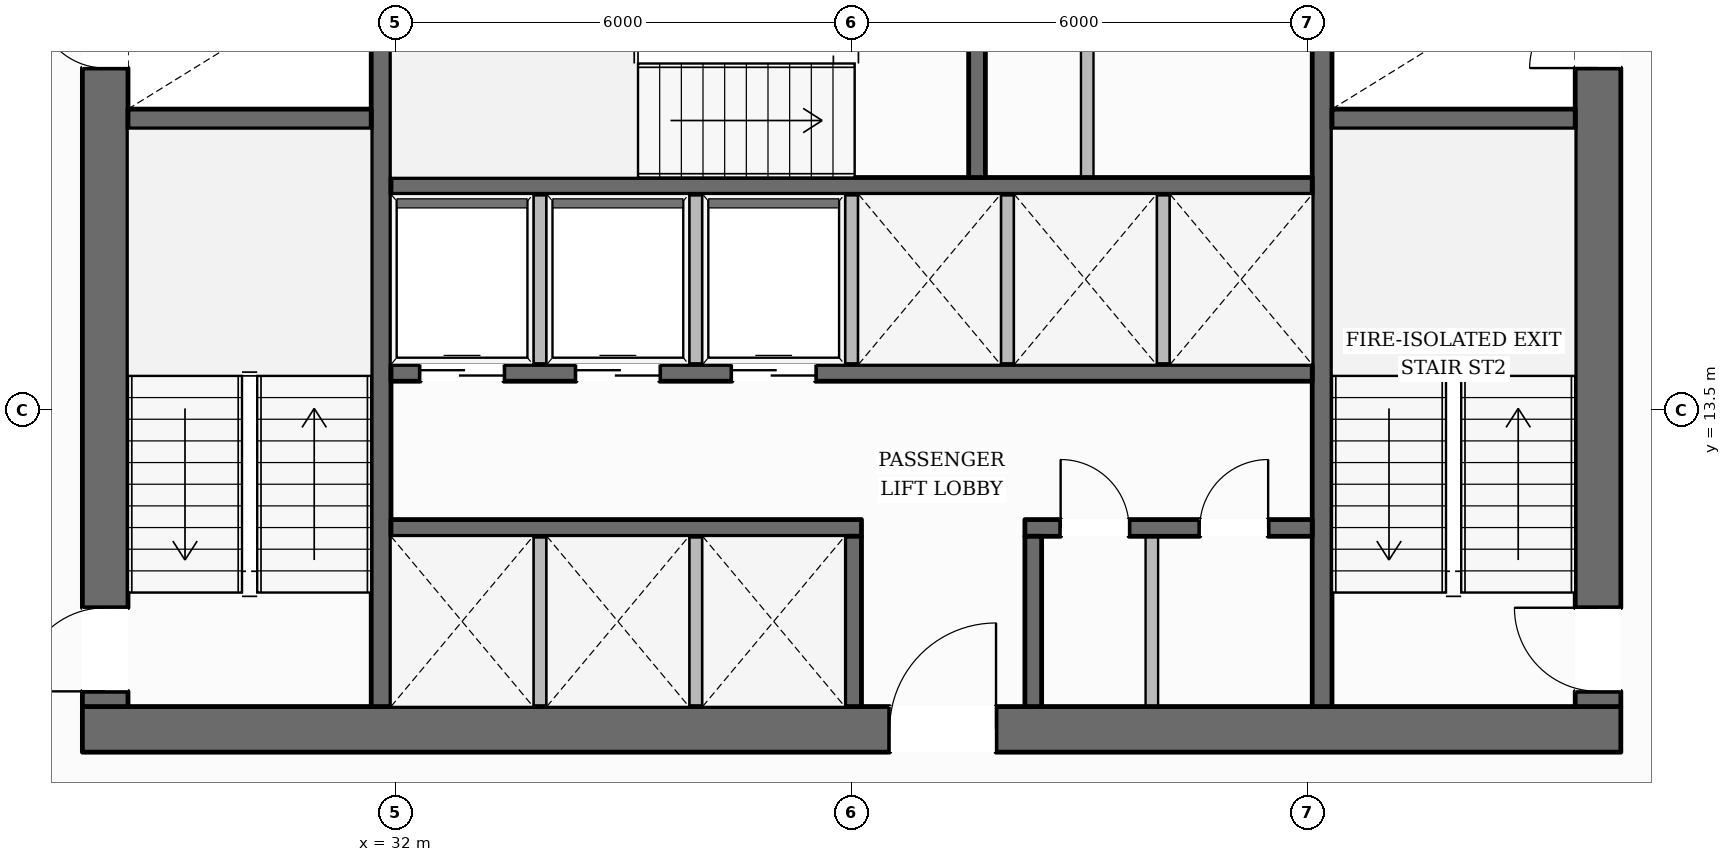
"""IFC4 building model, lengths in metres.
Left out: names, types, materials, properties, quantities, classifications, styles, units other than length and angle.
Written with IfcOpenShell. Run it as: python <this file> out.ifc"""

import sys

from ifc_helpers import new_model, si_unit, direction, frame, frame_2d, origin, place, context, subcontext, project, spatial, rectangle, extrude, element, fill, save


model = new_model("IFC4")
c1 = context("Model", 3, precision=1e-05, world=origin(), true_north=direction((0.0, 1.0)))
c2 = subcontext(c1, "Body", "Model", "MODEL_VIEW")
j1 = project(units=[si_unit("LENGTHUNIT", "METRE"), si_unit("PLANEANGLEUNIT", "RADIAN")], contexts=[c1])
p1 = place(None, origin())
s1 = spatial("IfcSite", under=j1, at=p1, CompositionType="ELEMENT")
p2 = place(p1, origin())
s2 = spatial("IfcBuilding", under=s1, at=p2, CompositionType="ELEMENT")
p3 = place(p2, frame((0.0, 0.0, 67.6)))
s3 = spatial("IfcBuildingStorey", under=s2, at=p3, CompositionType="ELEMENT", Elevation=67.6)
p4 = place(p3, frame((27.88, 9.3, 0.0), z_axis=(0.0, 0.0, 1.0), x_axis=(1.0, 0.0, 0.0)))
e1 = element("IfcWall", 1, at=p4, inside=s3, PredefinedType="SOLIDWALL", context=c2, shape_type="SweptSolid", body=[
    extrude(rectangle(XDim=20.24, YDim=0.6, at=frame_2d((10.12, 0.0))), origin(), (0.0, 0.0, 1.0), 3.59),
])
p5 = place(p4, frame((10.62, 0.0, 0.0)))
e2 = element("IfcOpeningElement", 2, at=p5, cuts=e1, PredefinedType="OPENING", context=c2, shape_type="SweptSolid", body=[
    extrude(rectangle(XDim=1.4, YDim=2.2, at=frame_2d((0.7, 1.1))), frame((0.0, 0.31, 0.0), z_axis=(0.0, -1.0, 0.0), x_axis=(1.0, 0.0, 0.0)), (0.0, 0.0, 1.0), 0.62),
])
p6 = place(p3, frame((28.18, 9.6, 0.0), z_axis=(0.0, 0.0, 1.0), x_axis=(0.0, 1.0, 0.0)))
e3 = element("IfcWall", 3, at=p6, inside=s3, PredefinedType="SOLIDWALL", context=c2, shape_type="SweptSolid", body=[
    extrude(rectangle(XDim=13.0, YDim=0.6, at=frame_2d((6.5, 0.0))), origin(), (0.0, 0.0, 1.0), 3.59),
])
p7 = place(p6, frame((0.2, 0.0, 0.0)))
e4 = element("IfcOpeningElement", 4, at=p7, cuts=e3, PredefinedType="OPENING", context=c2, shape_type="SweptSolid", body=[
    extrude(rectangle(XDim=1.1, YDim=2.15, at=frame_2d((0.55, 1.075))), frame((0.0, 0.31, 0.0), z_axis=(0.0, -1.0, 0.0), x_axis=(1.0, 0.0, 0.0)), (0.0, 0.0, 1.0), 0.62),
])
p8 = place(p6, frame((8.4, 0.0, 0.0)))
e5 = element("IfcOpeningElement", 5, at=p8, cuts=e3, PredefinedType="OPENING", context=c2, shape_type="SweptSolid", body=[
    extrude(rectangle(XDim=0.9, YDim=2.1, at=frame_2d((0.45, 1.05))), frame((0.0, 0.31, 0.0), z_axis=(0.0, -1.0, 0.0), x_axis=(1.0, 0.0, 0.0)), (0.0, 0.0, 1.0), 0.62),
])
p9 = place(p3, frame((47.82, 9.6, 0.0), z_axis=(0.0, 0.0, 1.0), x_axis=(0.0, 1.0, 0.0)))
e6 = element("IfcWall", 6, at=p9, inside=s3, PredefinedType="SOLIDWALL", context=c2, shape_type="SweptSolid", body=[
    extrude(rectangle(XDim=13.0, YDim=0.6, at=frame_2d((6.5, 0.0))), origin(), (0.0, 0.0, 1.0), 3.59),
])
p10 = place(p9, frame((0.2, 0.0, 0.0)))
e7 = element("IfcOpeningElement", 7, at=p10, cuts=e6, PredefinedType="OPENING", context=c2, shape_type="SweptSolid", body=[
    extrude(rectangle(XDim=1.1, YDim=2.15, at=frame_2d((0.55, 1.075))), frame((0.0, 0.31, 0.0), z_axis=(0.0, -1.0, 0.0), x_axis=(1.0, 0.0, 0.0)), (0.0, 0.0, 1.0), 0.62),
])
p11 = place(p9, frame((8.4, 0.0, 0.0)))
e8 = element("IfcOpeningElement", 8, at=p11, cuts=e6, PredefinedType="OPENING", context=c2, shape_type="SweptSolid", body=[
    extrude(rectangle(XDim=0.9, YDim=2.1, at=frame_2d((0.45, 1.05))), frame((0.0, 0.31, 0.0), z_axis=(0.0, -1.0, 0.0), x_axis=(1.0, 0.0, 0.0)), (0.0, 0.0, 1.0), 0.62),
])
p12 = place(p3, frame((31.81, 9.6, 0.0), z_axis=(0.0, 0.0, 1.0), x_axis=(0.0, 1.0, 0.0)))
e9 = element("IfcWall", 9, at=p12, inside=s3, PredefinedType="SHEAR", context=c2, shape_type="SweptSolid", body=[
    extrude(rectangle(XDim=13.0, YDim=0.26, at=frame_2d((6.5, 0.0))), origin(), (0.0, 0.0, 1.0), 3.59),
])
p13 = place(p12, frame((10.925, 0.0, 0.0)))
e10 = element("IfcOpeningElement", 10, at=p13, cuts=e9, PredefinedType="OPENING", context=c2, shape_type="SweptSolid", body=[
    extrude(rectangle(XDim=1.25, YDim=2.25, at=frame_2d((0.625, 1.125))), frame((0.0, 0.14, 0.0), z_axis=(0.0, -1.0, 0.0), x_axis=(1.0, 0.0, 0.0)), (0.0, 0.0, 1.0), 0.28),
])
p14 = place(p3, frame((44.19, 9.6, 0.0), z_axis=(0.0, 0.0, 1.0), x_axis=(0.0, 1.0, 0.0)))
e11 = element("IfcWall", 11, at=p14, inside=s3, PredefinedType="SHEAR", context=c2, shape_type="SweptSolid", body=[
    extrude(rectangle(XDim=13.0, YDim=0.26, at=frame_2d((6.5, 0.0))), origin(), (0.0, 0.0, 1.0), 3.59),
])
p15 = place(p14, frame((10.925, 0.0, 0.0)))
e12 = element("IfcOpeningElement", 12, at=p15, cuts=e11, PredefinedType="OPENING", context=c2, shape_type="SweptSolid", body=[
    extrude(rectangle(XDim=1.25, YDim=2.25, at=frame_2d((0.625, 1.125))), frame((0.0, 0.14, 0.0), z_axis=(0.0, -1.0, 0.0), x_axis=(1.0, 0.0, 0.0)), (0.0, 0.0, 1.0), 0.28),
])
for number, where, z_axis, x_axis in (
    (13, (28.48, 17.33, 0.0), (0.0, 0.0, 1.0), (1.0, 0.0, 0.0)),
    (14, (44.32, 17.33, 0.0), (0.0, 0.0, 1.0), (1.0, 0.0, 0.0)),
):
    element("IfcWall", number, at=place(p3, frame(where, z_axis=z_axis, x_axis=x_axis)), inside=s3, PredefinedType="SHEAR", context=c2, shape_type="SweptSolid", body=[
        extrude(rectangle(XDim=3.2, YDim=0.26, at=frame_2d((1.6, 0.0))), origin(), (0.0, 0.0, 1.0), 3.59),
    ])
p16 = place(p3, frame((31.94, 16.45, 0.0), z_axis=(0.0, 0.0, 1.0), x_axis=(1.0, 0.0, 0.0)))
e15 = element("IfcWall", 15, at=p16, inside=s3, PredefinedType="SOLIDWALL", context=c2, shape_type="SweptSolid", body=[
    extrude(rectangle(XDim=12.12, YDim=0.22, at=frame_2d((6.06, 0.0))), origin(), (0.0, 0.0, 1.0), 3.59),
])
p17 = place(p3, frame((39.65, 16.56, 0.0), z_axis=(0.0, 0.0, 1.0), x_axis=(0.0, 1.0, 0.0)))
e16 = element("IfcWall", 16, at=p17, inside=s3, PredefinedType="SOLIDWALL", context=c2, shape_type="SweptSolid", body=[
    extrude(rectangle(XDim=3.2, YDim=0.22, at=frame_2d((1.6, 0.0))), origin(), (0.0, 0.0, 1.0), 3.59),
])
p18 = place(p3, frame((31.94, 13.99, 0.0), z_axis=(0.0, 0.0, 1.0), x_axis=(1.0, 0.0, 0.0)))
e17 = element("IfcWall", 17, at=p18, inside=s3, PredefinedType="SOLIDWALL", context=c2, shape_type="SweptSolid", body=[
    extrude(rectangle(XDim=12.12, YDim=0.22, at=frame_2d((6.06, 0.0))), origin(), (0.0, 0.0, 1.0), 3.59),
])
p19 = place(p18, frame((0.385, 0.0, 0.0)))
e18 = element("IfcOpeningElement", 18, at=p19, cuts=e17, PredefinedType="OPENING", context=c2, shape_type="SweptSolid", body=[
    extrude(rectangle(XDim=1.1, YDim=2.2, at=frame_2d((0.55, 1.1))), frame((0.0, 0.12, 0.0), z_axis=(0.0, -1.0, 0.0), x_axis=(1.0, 0.0, 0.0)), (0.0, 0.0, 1.0), 0.24),
])
p20 = place(p18, frame((2.435, 0.0, 0.0)))
e19 = element("IfcOpeningElement", 19, at=p20, cuts=e17, PredefinedType="OPENING", context=c2, shape_type="SweptSolid", body=[
    extrude(rectangle(XDim=1.1, YDim=2.2, at=frame_2d((0.55, 1.1))), frame((0.0, 0.12, 0.0), z_axis=(0.0, -1.0, 0.0), x_axis=(1.0, 0.0, 0.0)), (0.0, 0.0, 1.0), 0.24),
])
p21 = place(p18, frame((4.485, 0.0, 0.0)))
e20 = element("IfcOpeningElement", 20, at=p21, cuts=e17, PredefinedType="OPENING", context=c2, shape_type="SweptSolid", body=[
    extrude(rectangle(XDim=1.1, YDim=2.2, at=frame_2d((0.55, 1.1))), frame((0.0, 0.12, 0.0), z_axis=(0.0, -1.0, 0.0), x_axis=(1.0, 0.0, 0.0)), (0.0, 0.0, 1.0), 0.24),
])
p22 = place(p3, frame((31.94, 11.95, 0.0), z_axis=(0.0, 0.0, 1.0), x_axis=(1.0, 0.0, 0.0)))
e21 = element("IfcWall", 21, at=p22, inside=s3, PredefinedType="SOLIDWALL", context=c2, shape_type="SweptSolid", body=[
    extrude(rectangle(XDim=6.19, YDim=0.22, at=frame_2d((3.095, 0.0))), origin(), (0.0, 0.0, 1.0), 3.59),
])
p23 = place(p3, frame((40.28, 11.95, 0.0), z_axis=(0.0, 0.0, 1.0), x_axis=(1.0, 0.0, 0.0)))
e22 = element("IfcWall", 22, at=p23, inside=s3, PredefinedType="SOLIDWALL", context=c2, shape_type="SweptSolid", body=[
    extrude(rectangle(XDim=3.78, YDim=0.22, at=frame_2d((1.89, 0.0))), origin(), (0.0, 0.0, 1.0), 3.59),
])
p24 = place(p23, frame((0.47, 0.0, 0.0)))
e23 = element("IfcOpeningElement", 23, at=p24, cuts=e22, PredefinedType="OPENING", context=c2, shape_type="SweptSolid", body=[
    extrude(rectangle(XDim=0.9, YDim=2.1, at=frame_2d((0.45, 1.05))), frame((0.0, 0.12, 0.0), z_axis=(0.0, -1.0, 0.0), x_axis=(1.0, 0.0, 0.0)), (0.0, 0.0, 1.0), 0.24),
])
p25 = place(p23, frame((2.3, 0.0, 0.0)))
e24 = element("IfcOpeningElement", 24, at=p25, cuts=e22, PredefinedType="OPENING", context=c2, shape_type="SweptSolid", body=[
    extrude(rectangle(XDim=0.9, YDim=2.1, at=frame_2d((0.45, 1.05))), frame((0.0, 0.12, 0.0), z_axis=(0.0, -1.0, 0.0), x_axis=(1.0, 0.0, 0.0)), (0.0, 0.0, 1.0), 0.24),
])
for number, where, z_axis, x_axis in (
    (25, (38.02, 9.6, 0.0), (0.0, 0.0, 1.0), (0.0, 1.0, 0.0)),
    (26, (40.39, 9.6, 0.0), (0.0, 0.0, 1.0), (0.0, 1.0, 0.0)),
):
    element("IfcWall", number, at=place(p3, frame(where, z_axis=z_axis, x_axis=x_axis)), inside=s3, PredefinedType="SOLIDWALL", context=c2, shape_type="SweptSolid", body=[
        extrude(rectangle(XDim=2.24, YDim=0.22, at=frame_2d((1.12, 0.0))), origin(), (0.0, 0.0, 1.0), 3.59),
    ])
p26 = place(p3, frame((12.513, 13.357, 0.0), z_axis=(0.0, 0.0, 1.0), x_axis=(0.505335851503, 0.862922752734, 0.0)))
e27 = element("IfcWall", 27, at=p26, inside=s3, PredefinedType="STANDARD", context=c2, shape_type="SweptSolid", body=[
    extrude(rectangle(XDim=36.293, YDim=0.38, at=frame_2d((18.147, 0.0))), origin(), (0.0, 0.0, 1.0), 2.97),
])
p27 = place(p26, frame((32.05, 0.0, 0.65)))
e28 = element("IfcOpeningElement", 28, at=p27, cuts=e27, PredefinedType="OPENING", context=c2, shape_type="SweptSolid", body=[
    extrude(rectangle(XDim=1.65, YDim=1.75, at=frame_2d((0.825, 0.875))), frame((0.0, 0.2, 0.0), z_axis=(0.0, -1.0, 0.0), x_axis=(1.0, 0.0, 0.0)), (0.0, 0.0, 1.0), 0.4),
])
p28 = place(p26, frame((26.159, 0.0, 0.65)))
e29 = element("IfcOpeningElement", 29, at=p28, cuts=e27, PredefinedType="OPENING", context=c2, shape_type="SweptSolid", body=[
    extrude(rectangle(XDim=1.65, YDim=1.75, at=frame_2d((0.825, 0.875))), frame((0.0, 0.2, 0.0), z_axis=(0.0, -1.0, 0.0), x_axis=(1.0, 0.0, 0.0)), (0.0, 0.0, 1.0), 0.4),
])
p29 = place(p26, frame((8.49, 0.0, 0.65)))
e30 = element("IfcOpeningElement", 30, at=p29, cuts=e27, PredefinedType="OPENING", context=c2, shape_type="SweptSolid", body=[
    extrude(rectangle(XDim=1.65, YDim=1.75, at=frame_2d((0.825, 0.875))), frame((0.0, 0.2, 0.0), z_axis=(0.0, -1.0, 0.0), x_axis=(1.0, 0.0, 0.0)), (0.0, 0.0, 1.0), 0.4),
])
p30 = place(p26, frame((2.6, 0.0, 0.65)))
e31 = element("IfcOpeningElement", 31, at=p30, cuts=e27, PredefinedType="OPENING", context=c2, shape_type="SweptSolid", body=[
    extrude(rectangle(XDim=1.65, YDim=1.75, at=frame_2d((0.825, 0.875))), frame((0.0, 0.2, 0.0), z_axis=(0.0, -1.0, 0.0), x_axis=(1.0, 0.0, 0.0)), (0.0, 0.0, 1.0), 0.4),
])
p31 = place(p3, frame((45.032, 44.743, 0.0), z_axis=(0.0, 0.0, 1.0), x_axis=(0.501444024373, -0.865190089183, 0.0)))
e32 = element("IfcWall", 32, at=p31, inside=s3, PredefinedType="STANDARD", context=c2, shape_type="SweptSolid", body=[
    extrude(rectangle(XDim=36.012, YDim=0.38, at=frame_2d((18.006, 0.0))), origin(), (0.0, 0.0, 1.0), 2.97),
])
p32 = place(p31, frame((31.786, 0.0, 0.65)))
e33 = element("IfcOpeningElement", 33, at=p32, cuts=e32, PredefinedType="OPENING", context=c2, shape_type="SweptSolid", body=[
    extrude(rectangle(XDim=1.65, YDim=1.75, at=frame_2d((0.825, 0.875))), frame((0.0, 0.2, 0.0), z_axis=(0.0, -1.0, 0.0), x_axis=(1.0, 0.0, 0.0)), (0.0, 0.0, 1.0), 0.4),
])
p33 = place(p31, frame((25.944, 0.0, 0.65)))
e34 = element("IfcOpeningElement", 34, at=p33, cuts=e32, PredefinedType="OPENING", context=c2, shape_type="SweptSolid", body=[
    extrude(rectangle(XDim=1.65, YDim=1.75, at=frame_2d((0.825, 0.875))), frame((0.0, 0.2, 0.0), z_axis=(0.0, -1.0, 0.0), x_axis=(1.0, 0.0, 0.0)), (0.0, 0.0, 1.0), 0.4),
])
p34 = place(p31, frame((14.259, 0.0, 0.65)))
e35 = element("IfcOpeningElement", 35, at=p34, cuts=e32, PredefinedType="OPENING", context=c2, shape_type="SweptSolid", body=[
    extrude(rectangle(XDim=1.65, YDim=1.75, at=frame_2d((0.825, 0.875))), frame((0.0, 0.2, 0.0), z_axis=(0.0, -1.0, 0.0), x_axis=(1.0, 0.0, 0.0)), (0.0, 0.0, 1.0), 0.4),
])
p35 = place(p31, frame((8.417, 0.0, 0.65)))
e36 = element("IfcOpeningElement", 36, at=p35, cuts=e32, PredefinedType="OPENING", context=c2, shape_type="SweptSolid", body=[
    extrude(rectangle(XDim=1.65, YDim=1.75, at=frame_2d((0.825, 0.875))), frame((0.0, 0.2, 0.0), z_axis=(0.0, -1.0, 0.0), x_axis=(1.0, 0.0, 0.0)), (0.0, 0.0, 1.0), 0.4),
])
p36 = place(p31, frame((2.574, 0.0, 0.65)))
e37 = element("IfcOpeningElement", 37, at=p36, cuts=e32, PredefinedType="OPENING", context=c2, shape_type="SweptSolid", body=[
    extrude(rectangle(XDim=1.65, YDim=1.75, at=frame_2d((0.825, 0.875))), frame((0.0, 0.2, 0.0), z_axis=(0.0, -1.0, 0.0), x_axis=(1.0, 0.0, 0.0)), (0.0, 0.0, 1.0), 0.4),
])
for number, where, z_axis, x_axis in (
    (38, (33.9, 9.6, 0.0), (0.0, 0.0, 1.0), (0.0, 1.0, 0.0)),
    (39, (35.95, 9.6, 0.0), (0.0, 0.0, 1.0), (0.0, 1.0, 0.0)),
    (40, (33.9, 14.1, 0.0), (0.0, 0.0, 1.0), (0.0, 1.0, 0.0)),
    (41, (35.95, 14.1, 0.0), (0.0, 0.0, 1.0), (0.0, 1.0, 0.0)),
    (42, (38.0, 14.1, 0.0), (0.0, 0.0, 1.0), (0.0, 1.0, 0.0)),
    (43, (40.05, 14.1, 0.0), (0.0, 0.0, 1.0), (0.0, 1.0, 0.0)),
    (44, (42.1, 14.1, 0.0), (0.0, 0.0, 1.0), (0.0, 1.0, 0.0)),
):
    element("IfcWall", number, at=place(p3, frame(where, z_axis=z_axis, x_axis=x_axis)), inside=s3, PredefinedType="PARTITIONING", context=c2, shape_type="SweptSolid", body=[
        extrude(rectangle(XDim=2.24, YDim=0.165, at=frame_2d((1.12, 0.0))), origin(), (0.0, 0.0, 1.0), 3.59),
    ])
p37 = place(p3, frame((41.1, 16.56, 0.0), z_axis=(0.0, 0.0, 1.0), x_axis=(0.0, 1.0, 0.0)))
e45 = element("IfcWall", 45, at=p37, inside=s3, PredefinedType="PARTITIONING", context=c2, shape_type="SweptSolid", body=[
    extrude(rectangle(XDim=3.2, YDim=0.165, at=frame_2d((1.6, 0.0))), origin(), (0.0, 0.0, 1.0), 3.59),
])
p38 = place(p3, frame((41.95, 9.6, 0.0), z_axis=(0.0, 0.0, 1.0), x_axis=(0.0, 1.0, 0.0)))
e46 = element("IfcWall", 46, at=p38, inside=s3, PredefinedType="PARTITIONING", context=c2, shape_type="SweptSolid", body=[
    extrude(rectangle(XDim=2.24, YDim=0.165, at=frame_2d((1.12, 0.0))), origin(), (0.0, 0.0, 1.0), 3.59),
])
p39 = place(p7, origin())
e47 = element("IfcDoor", 47, at=p39, inside=s3, OperationType="SINGLE_SWING_LEFT", PredefinedType="DOOR", context=c2, shape_type="SweptSolid", body=[
    extrude(rectangle(XDim=1.1, YDim=2.15, at=frame_2d((0.55, 1.075))), frame((0.0, 0.025, 0.0), z_axis=(0.0, -1.0, 0.0), x_axis=(1.0, 0.0, 0.0)), (0.0, 0.0, 1.0), 0.05),
])
fill(e4, e47)
p40 = place(p10, origin())
e48 = element("IfcDoor", 48, at=p40, inside=s3, OperationType="SINGLE_SWING_RIGHT", PredefinedType="DOOR", context=c2, shape_type="SweptSolid", body=[
    extrude(rectangle(XDim=1.1, YDim=2.15, at=frame_2d((0.55, 1.075))), frame((0.0, 0.025, 0.0), z_axis=(0.0, -1.0, 0.0), x_axis=(1.0, 0.0, 0.0)), (0.0, 0.0, 1.0), 0.05),
])
fill(e7, e48)
p41 = place(p8, origin())
e49 = element("IfcDoor", 49, at=p41, inside=s3, OperationType="SINGLE_SWING_RIGHT", PredefinedType="DOOR", context=c2, shape_type="SweptSolid", body=[
    extrude(rectangle(XDim=0.9, YDim=2.1, at=frame_2d((0.45, 1.05))), frame((0.0, 0.025, 0.0), z_axis=(0.0, -1.0, 0.0), x_axis=(1.0, 0.0, 0.0)), (0.0, 0.0, 1.0), 0.05),
])
fill(e5, e49)
p42 = place(p11, origin())
e50 = element("IfcDoor", 50, at=p42, inside=s3, OperationType="SINGLE_SWING_LEFT", PredefinedType="DOOR", context=c2, shape_type="SweptSolid", body=[
    extrude(rectangle(XDim=0.9, YDim=2.1, at=frame_2d((0.45, 1.05))), frame((0.0, 0.025, 0.0), z_axis=(0.0, -1.0, 0.0), x_axis=(1.0, 0.0, 0.0)), (0.0, 0.0, 1.0), 0.05),
])
fill(e8, e50)
p43 = place(p5, origin())
e51 = element("IfcDoor", 51, at=p43, inside=s3, OperationType="SINGLE_SWING_RIGHT", PredefinedType="DOOR", context=c2, shape_type="SweptSolid", body=[
    extrude(rectangle(XDim=1.4, YDim=2.2, at=frame_2d((0.7, 1.1))), frame((0.0, 0.025, 0.0), z_axis=(0.0, -1.0, 0.0), x_axis=(1.0, 0.0, 0.0)), (0.0, 0.0, 1.0), 0.05),
])
fill(e2, e51)
p44 = place(p19, origin())
e52 = element("IfcDoor", 52, at=p44, inside=s3, OperationType="DOUBLE_DOOR_SLIDING", PredefinedType="DOOR", context=c2, shape_type="SweptSolid", body=[
    extrude(rectangle(XDim=1.1, YDim=2.2, at=frame_2d((0.55, 1.1))), frame((0.0, 0.025, 0.0), z_axis=(0.0, -1.0, 0.0), x_axis=(1.0, 0.0, 0.0)), (0.0, 0.0, 1.0), 0.05),
])
fill(e18, e52)
p45 = place(p20, origin())
e53 = element("IfcDoor", 53, at=p45, inside=s3, OperationType="DOUBLE_DOOR_SLIDING", PredefinedType="DOOR", context=c2, shape_type="SweptSolid", body=[
    extrude(rectangle(XDim=1.1, YDim=2.2, at=frame_2d((0.55, 1.1))), frame((0.0, 0.025, 0.0), z_axis=(0.0, -1.0, 0.0), x_axis=(1.0, 0.0, 0.0)), (0.0, 0.0, 1.0), 0.05),
])
fill(e19, e53)
p46 = place(p21, origin())
e54 = element("IfcDoor", 54, at=p46, inside=s3, OperationType="DOUBLE_DOOR_SLIDING", PredefinedType="DOOR", context=c2, shape_type="SweptSolid", body=[
    extrude(rectangle(XDim=1.1, YDim=2.2, at=frame_2d((0.55, 1.1))), frame((0.0, 0.025, 0.0), z_axis=(0.0, -1.0, 0.0), x_axis=(1.0, 0.0, 0.0)), (0.0, 0.0, 1.0), 0.05),
])
fill(e20, e54)
p47 = place(p24, origin())
e55 = element("IfcDoor", 55, at=p47, inside=s3, OperationType="SINGLE_SWING_LEFT", PredefinedType="DOOR", context=c2, shape_type="SweptSolid", body=[
    extrude(rectangle(XDim=0.9, YDim=2.1, at=frame_2d((0.45, 1.05))), frame((0.0, 0.025, 0.0), z_axis=(0.0, -1.0, 0.0), x_axis=(1.0, 0.0, 0.0)), (0.0, 0.0, 1.0), 0.05),
])
fill(e23, e55)
p48 = place(p25, origin())
e56 = element("IfcDoor", 56, at=p48, inside=s3, OperationType="SINGLE_SWING_RIGHT", PredefinedType="DOOR", context=c2, shape_type="SweptSolid", body=[
    extrude(rectangle(XDim=0.9, YDim=2.1, at=frame_2d((0.45, 1.05))), frame((0.0, 0.025, 0.0), z_axis=(0.0, -1.0, 0.0), x_axis=(1.0, 0.0, 0.0)), (0.0, 0.0, 1.0), 0.05),
])
fill(e24, e56)
save(model, sys.argv[1])
